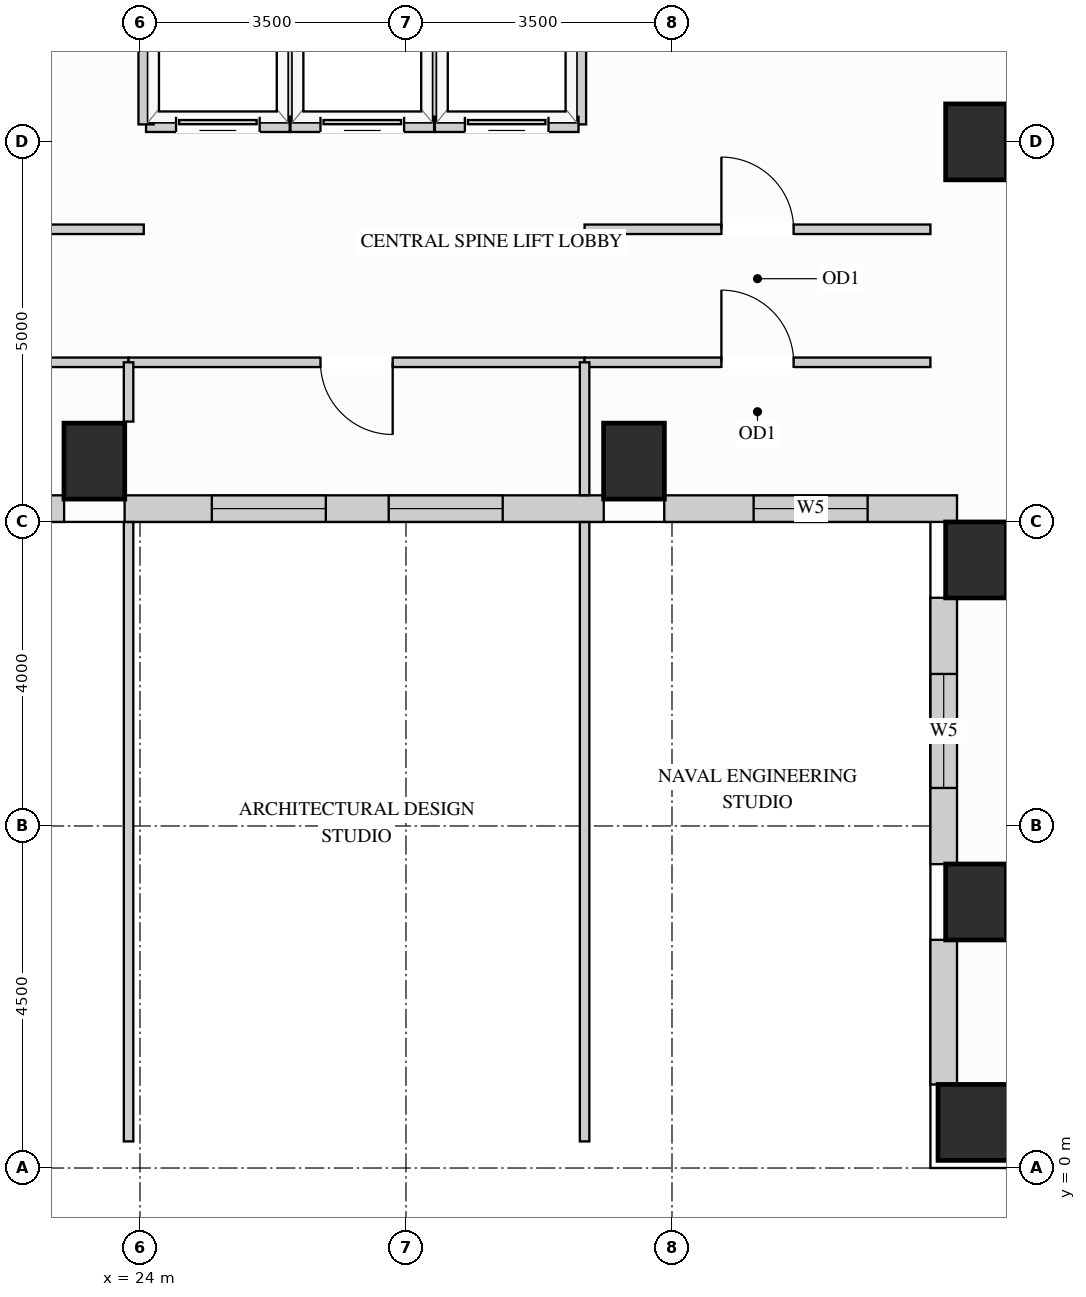
"""IFC4 building model, lengths in metres.
Left out: names, types, materials, properties, quantities, classifications, styles, units other than length and angle.
Written with IfcOpenShell. Run it as: python <this file> out.ifc"""

import sys

from ifc_helpers import new_model, si_unit, direction, frame, frame_2d, origin, origin_2d, place, context, subcontext, project, spatial, rectangle, extrude, source, transform, mapped, element, fill, save


model = new_model("IFC4")
c1 = context("Model", 3, precision=1e-05, world=origin(), true_north=direction((0.0, 1.0)))
c2 = subcontext(c1, "Body", "Model", "MODEL_VIEW")
j1 = project(units=[si_unit("LENGTHUNIT", "METRE"), si_unit("PLANEANGLEUNIT", "RADIAN")], contexts=[c1])
p1 = place(None, origin())
s1 = spatial("IfcSite", under=j1, at=p1, CompositionType="ELEMENT")
p2 = place(p1, origin())
s2 = spatial("IfcBuilding", under=s1, at=p2, CompositionType="ELEMENT")
p3 = place(p2, frame((0.0, 0.0, 200.7)))
s3 = spatial("IfcBuildingStorey", under=s2, at=p3, CompositionType="ELEMENT", Elevation=200.7)
m1 = source(origin(), c2, "Body", "SweptSolid", [
    extrude(rectangle(XDim=0.8, YDim=1.0, at=origin_2d()), origin(), (0.0, 0.0, 1.0), 3.4),
])
for number, where, z_axis, x_axis in (
    (1, (35.0, 13.5, 0.0), (0.0, 0.0, 1.0), (1.0, 0.0, 0.0)),
    (2, (35.0, 3.5, 0.0), (0.0, 0.0, 1.0), (1.0, 0.0, 0.0)),
    (3, (35.0, 8.0, 0.0), (0.0, 0.0, 1.0), (1.0, 0.0, 0.0)),
    (4, (23.4, 9.3, 0.0), (0.0, 0.0, 1.0), (1.0, 0.0, 0.0)),
    (5, (30.5, 9.3, 0.0), (0.0, 0.0, 1.0), (1.0, 0.0, 0.0)),
):
    element("IfcColumn", number, at=place(p3, frame(where, z_axis=z_axis, x_axis=x_axis)), inside=s3, PredefinedType="COLUMN", context=c2, shape_type="MappedRepresentation", body=[
        mapped(m1, transform((0.0, 0.0, 0.0), x_axis=(1.0, 0.0, 0.0), y_axis=(0.0, 1.0, 0.0), z_axis=(0.0, 0.0, 1.0))),
    ])
m2 = source(origin(), c2, "Body", "SweptSolid", [
    extrude(rectangle(XDim=1.0, YDim=1.0, at=origin_2d()), origin(), (0.0, 0.0, 1.0), 3.4),
])
p4 = place(p3, frame((35.0, 0.6, 0.0), z_axis=(0.0, 0.0, 1.0), x_axis=(1.0, 0.0, 0.0)))
e6 = element("IfcColumn", 6, at=p4, inside=s3, PredefinedType="COLUMN", context=c2, shape_type="MappedRepresentation", body=[
    mapped(m2, transform((0.0, 0.0, 0.0), x_axis=(1.0, 0.0, 0.0), y_axis=(0.0, 1.0, 0.0), z_axis=(0.0, 0.0, 1.0))),
])
p5 = place(p3, frame((19.398, 8.675, 0.0), z_axis=(0.0, 0.0, 1.0), x_axis=(1.0, 0.0, 0.0)))
e7 = element("IfcWall", 7, at=p5, inside=s3, PredefinedType="SOLIDWALL", context=c2, shape_type="SweptSolid", body=[
    extrude(rectangle(XDim=3.604, YDim=0.35, at=frame_2d((1.802, 0.0))), origin(), (0.0, 0.0, 1.0), 3.385),
])
p6 = place(p5, frame((1.067, 0.0, 0.78)))
e8 = element("IfcOpeningElement", 8, at=p6, cuts=e7, PredefinedType="OPENING", context=c2, shape_type="SweptSolid", body=[
    extrude(rectangle(XDim=1.5, YDim=2.0, at=frame_2d((0.75, 1.0))), frame((0.0, 0.185, 0.0), z_axis=(0.0, -1.0, 0.0), x_axis=(1.0, 0.0, 0.0)), (0.0, 0.0, 1.0), 0.37),
])
p7 = place(p3, frame((23.798, 8.675, 0.0), z_axis=(0.0, 0.0, 1.0), x_axis=(1.0, 0.0, 0.0)))
e9 = element("IfcWall", 9, at=p7, inside=s3, PredefinedType="SOLIDWALL", context=c2, shape_type="SweptSolid", body=[
    extrude(rectangle(XDim=6.304, YDim=0.35, at=frame_2d((3.152, 0.0))), origin(), (0.0, 0.0, 1.0), 3.385),
])
p8 = place(p7, frame((1.147, 0.0, 0.78)))
e10 = element("IfcOpeningElement", 10, at=p8, cuts=e9, PredefinedType="OPENING", context=c2, shape_type="SweptSolid", body=[
    extrude(rectangle(XDim=1.5, YDim=2.0, at=frame_2d((0.75, 1.0))), frame((0.0, 0.185, 0.0), z_axis=(0.0, -1.0, 0.0), x_axis=(1.0, 0.0, 0.0)), (0.0, 0.0, 1.0), 0.37),
])
p9 = place(p7, frame((3.475, 0.0, 0.78)))
e11 = element("IfcOpeningElement", 11, at=p9, cuts=e9, PredefinedType="OPENING", context=c2, shape_type="SweptSolid", body=[
    extrude(rectangle(XDim=1.5, YDim=2.0, at=frame_2d((0.75, 1.0))), frame((0.0, 0.185, 0.0), z_axis=(0.0, -1.0, 0.0), x_axis=(1.0, 0.0, 0.0)), (0.0, 0.0, 1.0), 0.37),
])
p10 = place(p3, frame((30.898, 8.675, 0.0), z_axis=(0.0, 0.0, 1.0), x_axis=(1.0, 0.0, 0.0)))
e12 = element("IfcWall", 12, at=p10, inside=s3, PredefinedType="SOLIDWALL", context=c2, shape_type="SweptSolid", body=[
    extrude(rectangle(XDim=3.852, YDim=0.35, at=frame_2d((1.926, 0.0))), origin(), (0.0, 0.0, 1.0), 3.385),
])
p11 = place(p10, frame((1.176, 0.0, 0.78)))
e13 = element("IfcOpeningElement", 13, at=p11, cuts=e12, PredefinedType="OPENING", context=c2, shape_type="SweptSolid", body=[
    extrude(rectangle(XDim=1.5, YDim=2.0, at=frame_2d((0.75, 1.0))), frame((0.0, 0.185, 0.0), z_axis=(0.0, -1.0, 0.0), x_axis=(1.0, 0.0, 0.0)), (0.0, 0.0, 1.0), 0.37),
])
p12 = place(p3, frame((34.575, 7.502, 0.0), z_axis=(0.0, 0.0, 1.0), x_axis=(0.0, -1.0, 0.0)))
e14 = element("IfcWall", 14, at=p12, inside=s3, PredefinedType="SOLIDWALL", context=c2, shape_type="SweptSolid", body=[
    extrude(rectangle(XDim=3.504, YDim=0.35, at=frame_2d((1.752, 0.0))), origin(), (0.0, 0.0, 1.0), 2.612),
])
p13 = place(p12, frame((1.002, 0.0, 0.78)))
e15 = element("IfcOpeningElement", 15, at=p13, cuts=e14, PredefinedType="OPENING", context=c2, shape_type="SweptSolid", body=[
    extrude(rectangle(XDim=1.5, YDim=1.652, at=frame_2d((0.75, 0.826))), frame((0.0, 0.185, 0.0), z_axis=(0.0, -1.0, 0.0), x_axis=(1.0, 0.0, 0.0)), (0.0, 0.0, 1.0), 0.37),
])
m3 = source(origin(), c2, "Body", "SweptSolid", [
    extrude(rectangle(XDim=1.904, YDim=0.35, at=frame_2d((0.952, 0.0))), origin(), (0.0, 0.0, 1.0), 2.612),
])
p14 = place(p3, frame((34.575, 3.002, 0.0), z_axis=(0.0, 0.0, 1.0), x_axis=(0.0, -1.0, 0.0)))
e16 = element("IfcWall", 16, at=p14, inside=s3, PredefinedType="SOLIDWALL", context=c2, shape_type="MappedRepresentation", body=[
    mapped(m3, transform((0.0, 0.0, 0.0), x_axis=(1.0, 0.0, 0.0), y_axis=(0.0, 1.0, 0.0), z_axis=(0.0, 0.0, 1.0))),
])
p15 = place(p3, frame((29.85, 12.35, 0.0), z_axis=(0.0, 0.0, 1.0), x_axis=(1.0, 0.0, 0.0)))
e17 = element("IfcWall", 17, at=p15, inside=s3, PredefinedType="PARTITIONING", context=c2, shape_type="SweptSolid", body=[
    extrude(rectangle(XDim=4.55, YDim=0.125, at=frame_2d((2.275, 0.0))), origin(), (0.0, 0.0, 1.0), 3.385),
])
p16 = place(p15, frame((1.8, 0.0, 0.0)))
e18 = element("IfcOpeningElement", 18, at=p16, cuts=e17, PredefinedType="OPENING", context=c2, shape_type="SweptSolid", body=[
    extrude(rectangle(XDim=0.95, YDim=2.15, at=frame_2d((0.475, 1.075))), frame((0.0, 0.073, 0.0), z_axis=(0.0, -1.0, 0.0), x_axis=(1.0, 0.0, 0.0)), (0.0, 0.0, 1.0), 0.145),
])
p17 = place(p3, frame((19.5, 12.35, 0.0), z_axis=(0.0, 0.0, 1.0), x_axis=(1.0, 0.0, 0.0)))
e19 = element("IfcWall", 19, at=p17, inside=s3, PredefinedType="PARTITIONING", context=c2, shape_type="SweptSolid", body=[
    extrude(rectangle(XDim=4.55, YDim=0.125, at=frame_2d((2.275, 0.0))), origin(), (0.0, 0.0, 1.0), 3.385),
])
p18 = place(p17, frame((1.8, 0.0, 0.0)))
e20 = element("IfcOpeningElement", 20, at=p18, cuts=e19, PredefinedType="OPENING", context=c2, shape_type="SweptSolid", body=[
    extrude(rectangle(XDim=0.95, YDim=2.15, at=frame_2d((0.475, 1.075))), frame((0.0, 0.073, 0.0), z_axis=(0.0, -1.0, 0.0), x_axis=(1.0, 0.0, 0.0)), (0.0, 0.0, 1.0), 0.145),
])
p19 = place(p3, frame((19.5, 10.6, 0.0), z_axis=(0.0, 0.0, 1.0), x_axis=(1.0, 0.0, 0.0)))
e21 = element("IfcWall", 21, at=p19, inside=s3, PredefinedType="PARTITIONING", context=c2, shape_type="SweptSolid", body=[
    extrude(rectangle(XDim=4.35, YDim=0.125, at=frame_2d((2.175, 0.0))), origin(), (0.0, 0.0, 1.0), 3.385),
])
p20 = place(p19, frame((1.7, 0.0, 0.0)))
e22 = element("IfcOpeningElement", 22, at=p20, cuts=e21, PredefinedType="OPENING", context=c2, shape_type="SweptSolid", body=[
    extrude(rectangle(XDim=0.95, YDim=2.15, at=frame_2d((0.475, 1.075))), frame((0.0, 0.073, 0.0), z_axis=(0.0, -1.0, 0.0), x_axis=(1.0, 0.0, 0.0)), (0.0, 0.0, 1.0), 0.145),
])
p21 = place(p3, frame((23.85, 10.6, 0.0), z_axis=(0.0, 0.0, 1.0), x_axis=(1.0, 0.0, 0.0)))
e23 = element("IfcWall", 23, at=p21, inside=s3, PredefinedType="PARTITIONING", context=c2, shape_type="SweptSolid", body=[
    extrude(rectangle(XDim=6.0, YDim=0.125, at=frame_2d((3.0, 0.0))), origin(), (0.0, 0.0, 1.0), 3.385),
])
p22 = place(p21, frame((2.525, 0.0, 0.0)))
e24 = element("IfcOpeningElement", 24, at=p22, cuts=e23, PredefinedType="OPENING", context=c2, shape_type="SweptSolid", body=[
    extrude(rectangle(XDim=0.95, YDim=2.15, at=frame_2d((0.475, 1.075))), frame((0.0, 0.073, 0.0), z_axis=(0.0, -1.0, 0.0), x_axis=(1.0, 0.0, 0.0)), (0.0, 0.0, 1.0), 0.145),
])
p23 = place(p3, frame((29.85, 10.6, 0.0), z_axis=(0.0, 0.0, 1.0), x_axis=(1.0, 0.0, 0.0)))
e25 = element("IfcWall", 25, at=p23, inside=s3, PredefinedType="PARTITIONING", context=c2, shape_type="SweptSolid", body=[
    extrude(rectangle(XDim=4.55, YDim=0.125, at=frame_2d((2.275, 0.0))), origin(), (0.0, 0.0, 1.0), 3.385),
])
p24 = place(p23, frame((1.8, 0.0, 0.0)))
e26 = element("IfcOpeningElement", 26, at=p24, cuts=e25, PredefinedType="OPENING", context=c2, shape_type="SweptSolid", body=[
    extrude(rectangle(XDim=0.95, YDim=2.15, at=frame_2d((0.475, 1.075))), frame((0.0, 0.073, 0.0), z_axis=(0.0, -1.0, 0.0), x_axis=(1.0, 0.0, 0.0)), (0.0, 0.0, 1.0), 0.145),
])
m4 = source(origin(), c2, "Body", "SweptSolid", [
    extrude(rectangle(XDim=8.148, YDim=0.125, at=frame_2d((4.074, 0.0))), origin(), (0.0, 0.0, 1.0), 3.385),
])
p25 = place(p3, frame((23.85, 0.35, 0.0), z_axis=(0.0, 0.0, 1.0), x_axis=(0.0, 1.0, 0.0)))
e27 = element("IfcWall", 27, at=p25, inside=s3, PredefinedType="PARTITIONING", context=c2, shape_type="MappedRepresentation", body=[
    mapped(m4, transform((0.0, 0.0, 0.0), x_axis=(1.0, 0.0, 0.0), y_axis=(0.0, 1.0, 0.0), z_axis=(0.0, 0.0, 1.0))),
])
m5 = source(origin(), c2, "Body", "SweptSolid", [
    extrude(rectangle(XDim=0.78, YDim=0.125, at=frame_2d((0.39, 0.0))), origin(), (0.0, 0.0, 1.0), 3.385),
])
p26 = place(p3, frame((23.85, 9.82, 0.0), z_axis=(0.0, 0.0, 1.0), x_axis=(0.0, 1.0, 0.0)))
e28 = element("IfcWall", 28, at=p26, inside=s3, PredefinedType="PARTITIONING", context=c2, shape_type="MappedRepresentation", body=[
    mapped(m5, transform((0.0, 0.0, 0.0), x_axis=(1.0, 0.0, 0.0), y_axis=(0.0, 1.0, 0.0), z_axis=(0.0, 0.0, 1.0))),
])
p27 = place(p3, frame((29.85, 0.35, 0.0), z_axis=(0.0, 0.0, 1.0), x_axis=(0.0, 1.0, 0.0)))
e29 = element("IfcWall", 29, at=p27, inside=s3, PredefinedType="PARTITIONING", context=c2, shape_type="MappedRepresentation", body=[
    mapped(m4, transform((0.0, 0.0, 0.0), x_axis=(1.0, 0.0, 0.0), y_axis=(0.0, 1.0, 0.0), z_axis=(0.0, 0.0, 1.0))),
])
m6 = source(origin(), c2, "Body", "SweptSolid", [
    extrude(rectangle(XDim=1.748, YDim=0.125, at=frame_2d((0.874, 0.0))), origin(), (0.0, 0.0, 1.0), 3.385),
])
p28 = place(p3, frame((29.85, 8.852, 0.0), z_axis=(0.0, 0.0, 1.0), x_axis=(0.0, 1.0, 0.0)))
e30 = element("IfcWall", 30, at=p28, inside=s3, PredefinedType="PARTITIONING", context=c2, shape_type="MappedRepresentation", body=[
    mapped(m6, transform((0.0, 0.0, 0.0), x_axis=(1.0, 0.0, 0.0), y_axis=(0.0, 1.0, 0.0), z_axis=(0.0, 0.0, 1.0))),
])
m7 = source(origin(), c2, "Body", "SweptSolid", [
    extrude(rectangle(XDim=2.29, YDim=0.2, at=frame_2d((1.145, 0.0))), origin(), (0.0, 0.0, 1.0), 3.385),
])
p29 = place(p3, frame((25.97, 13.73, 0.0), z_axis=(0.0, 0.0, 1.0), x_axis=(0.0, 1.0, 0.0)))
e31 = element("IfcWall", 31, at=p29, inside=s3, PredefinedType="PARTITIONING", context=c2, shape_type="MappedRepresentation", body=[
    mapped(m7, transform((0.0, 0.0, 0.0), x_axis=(1.0, 0.0, 0.0), y_axis=(0.0, 1.0, 0.0), z_axis=(0.0, 0.0, 1.0))),
])
p30 = place(p3, frame((24.08, 13.73, 0.0), z_axis=(0.0, 0.0, 1.0), x_axis=(1.0, 0.0, 0.0)))
e32 = element("IfcWall", 32, at=p30, inside=s3, PredefinedType="PARTITIONING", context=c2, shape_type="SweptSolid", body=[
    extrude(rectangle(XDim=1.89, YDim=0.2, at=frame_2d((0.945, 0.0))), origin(), (0.0, 0.0, 1.0), 2.466),
])
p31 = place(p30, frame((0.395, 0.0, 0.0)))
e33 = element("IfcOpeningElement", 33, at=p31, cuts=e32, PredefinedType="OPENING", context=c2, shape_type="SweptSolid", body=[
    extrude(rectangle(XDim=1.1, YDim=2.2, at=frame_2d((0.55, 1.1))), frame((0.0, 0.11, 0.0), z_axis=(0.0, -1.0, 0.0), x_axis=(1.0, 0.0, 0.0)), (0.0, 0.0, 1.0), 0.22),
])
for number, where, z_axis, x_axis in (
    (34, (24.08, 13.73, 0.0), (0.0, 0.0, 1.0), (0.0, 1.0, 0.0)),
    (35, (27.87, 13.73, 0.0), (0.0, 0.0, 1.0), (0.0, 1.0, 0.0)),
):
    element("IfcWall", number, at=place(p3, frame(where, z_axis=z_axis, x_axis=x_axis)), inside=s3, PredefinedType="PARTITIONING", context=c2, shape_type="MappedRepresentation", body=[
        mapped(m7, transform((0.0, 0.0, 0.0), x_axis=(1.0, 0.0, 0.0), y_axis=(0.0, 1.0, 0.0), z_axis=(0.0, 0.0, 1.0))),
    ])
p32 = place(p3, frame((25.98, 13.73, 0.0), z_axis=(0.0, 0.0, 1.0), x_axis=(1.0, 0.0, 0.0)))
e36 = element("IfcWall", 36, at=p32, inside=s3, PredefinedType="PARTITIONING", context=c2, shape_type="SweptSolid", body=[
    extrude(rectangle(XDim=1.89, YDim=0.2, at=frame_2d((0.945, 0.0))), origin(), (0.0, 0.0, 1.0), 2.466),
])
p33 = place(p32, frame((0.395, 0.0, 0.0)))
e37 = element("IfcOpeningElement", 37, at=p33, cuts=e36, PredefinedType="OPENING", context=c2, shape_type="SweptSolid", body=[
    extrude(rectangle(XDim=1.1, YDim=2.2, at=frame_2d((0.55, 1.1))), frame((0.0, 0.11, 0.0), z_axis=(0.0, -1.0, 0.0), x_axis=(1.0, 0.0, 0.0)), (0.0, 0.0, 1.0), 0.22),
])
p34 = place(p3, frame((29.77, 13.73, 0.0), z_axis=(0.0, 0.0, 1.0), x_axis=(0.0, 1.0, 0.0)))
e38 = element("IfcWall", 38, at=p34, inside=s3, PredefinedType="PARTITIONING", context=c2, shape_type="MappedRepresentation", body=[
    mapped(m7, transform((0.0, 0.0, 0.0), x_axis=(1.0, 0.0, 0.0), y_axis=(0.0, 1.0, 0.0), z_axis=(0.0, 0.0, 1.0))),
])
p35 = place(p3, frame((27.88, 13.73, 0.0), z_axis=(0.0, 0.0, 1.0), x_axis=(1.0, 0.0, 0.0)))
e39 = element("IfcWall", 39, at=p35, inside=s3, PredefinedType="PARTITIONING", context=c2, shape_type="SweptSolid", body=[
    extrude(rectangle(XDim=1.89, YDim=0.2, at=frame_2d((0.945, 0.0))), origin(), (0.0, 0.0, 1.0), 2.466),
])
p36 = place(p35, frame((0.395, 0.0, 0.0)))
e40 = element("IfcOpeningElement", 40, at=p36, cuts=e39, PredefinedType="OPENING", context=c2, shape_type="SweptSolid", body=[
    extrude(rectangle(XDim=1.1, YDim=2.2, at=frame_2d((0.55, 1.1))), frame((0.0, 0.11, 0.0), z_axis=(0.0, -1.0, 0.0), x_axis=(1.0, 0.0, 0.0)), (0.0, 0.0, 1.0), 0.22),
])
m8 = source(origin(), c2, "Body", "SweptSolid", [
    extrude(rectangle(XDim=1.1, YDim=2.2, at=frame_2d((0.55, 1.1))), frame((0.0, 0.025, 0.0), z_axis=(0.0, -1.0, 0.0), x_axis=(1.0, 0.0, 0.0)), (0.0, 0.0, 1.0), 0.05),
])
p37 = place(p31, origin())
e41 = element("IfcDoor", 41, at=p37, inside=s3, OperationType="SLIDING_TO_LEFT", PredefinedType="DOOR", context=c2, shape_type="MappedRepresentation", body=[
    mapped(m8, transform((0.0, 0.0, 0.0), x_axis=(1.0, 0.0, 0.0), y_axis=(0.0, 1.0, 0.0), z_axis=(0.0, 0.0, 1.0))),
])
fill(e33, e41)
p38 = place(p33, origin())
e42 = element("IfcDoor", 42, at=p38, inside=s3, OperationType="SLIDING_TO_LEFT", PredefinedType="DOOR", context=c2, shape_type="MappedRepresentation", body=[
    mapped(m8, transform((0.0, 0.0, 0.0), x_axis=(1.0, 0.0, 0.0), y_axis=(0.0, 1.0, 0.0), z_axis=(0.0, 0.0, 1.0))),
])
fill(e37, e42)
p39 = place(p36, origin())
e43 = element("IfcDoor", 43, at=p39, inside=s3, OperationType="SLIDING_TO_LEFT", PredefinedType="DOOR", context=c2, shape_type="MappedRepresentation", body=[
    mapped(m8, transform((0.0, 0.0, 0.0), x_axis=(1.0, 0.0, 0.0), y_axis=(0.0, 1.0, 0.0), z_axis=(0.0, 0.0, 1.0))),
])
fill(e40, e43)
m9 = source(origin(), c2, "Body", "SweptSolid", [
    extrude(rectangle(XDim=0.95, YDim=2.15, at=frame_2d((0.475, 1.075))), frame((0.0, 0.025, 0.0), z_axis=(0.0, -1.0, 0.0), x_axis=(1.0, 0.0, 0.0)), (0.0, 0.0, 1.0), 0.05),
])
p40 = place(p16, origin())
e44 = element("IfcDoor", 44, at=p40, inside=s3, OperationType="SINGLE_SWING_LEFT", PredefinedType="DOOR", context=c2, shape_type="MappedRepresentation", body=[
    mapped(m9, transform((0.0, 0.0, 0.0), x_axis=(1.0, 0.0, 0.0), y_axis=(0.0, 1.0, 0.0), z_axis=(0.0, 0.0, 1.0))),
])
fill(e18, e44)
p41 = place(p22, origin())
e45 = element("IfcDoor", 45, at=p41, inside=s3, OperationType="SINGLE_SWING_RIGHT", PredefinedType="DOOR", context=c2, shape_type="MappedRepresentation", body=[
    mapped(m9, transform((0.0, 0.0, 0.0), x_axis=(1.0, 0.0, 0.0), y_axis=(0.0, 1.0, 0.0), z_axis=(0.0, 0.0, 1.0))),
])
fill(e24, e45)
p42 = place(p24, origin())
e46 = element("IfcDoor", 46, at=p42, inside=s3, OperationType="SINGLE_SWING_LEFT", PredefinedType="DOOR", context=c2, shape_type="MappedRepresentation", body=[
    mapped(m9, transform((0.0, 0.0, 0.0), x_axis=(1.0, 0.0, 0.0), y_axis=(0.0, 1.0, 0.0), z_axis=(0.0, 0.0, 1.0))),
])
fill(e26, e46)
m10 = source(origin(), c2, "Body", "SweptSolid", [
    extrude(rectangle(XDim=1.5, YDim=2.0, at=frame_2d((0.75, 1.0))), frame((0.0, 0.03, 0.0), z_axis=(0.0, -1.0, 0.0), x_axis=(1.0, 0.0, 0.0)), (0.0, 0.0, 1.0), 0.06),
])
p43 = place(p8, origin())
e47 = element("IfcWindow", 47, at=p43, inside=s3, PartitioningType="SINGLE_PANEL", PredefinedType="WINDOW", context=c2, shape_type="MappedRepresentation", body=[
    mapped(m10, transform((0.0, 0.0, 0.0), x_axis=(1.0, 0.0, 0.0), y_axis=(0.0, 1.0, 0.0), z_axis=(0.0, 0.0, 1.0))),
])
fill(e10, e47)
p44 = place(p9, origin())
e48 = element("IfcWindow", 48, at=p44, inside=s3, PartitioningType="SINGLE_PANEL", PredefinedType="WINDOW", context=c2, shape_type="MappedRepresentation", body=[
    mapped(m10, transform((0.0, 0.0, 0.0), x_axis=(1.0, 0.0, 0.0), y_axis=(0.0, 1.0, 0.0), z_axis=(0.0, 0.0, 1.0))),
])
fill(e11, e48)
p45 = place(p11, origin())
e49 = element("IfcWindow", 49, at=p45, inside=s3, PartitioningType="SINGLE_PANEL", PredefinedType="WINDOW", context=c2, shape_type="MappedRepresentation", body=[
    mapped(m10, transform((0.0, 0.0, 0.0), x_axis=(1.0, 0.0, 0.0), y_axis=(0.0, 1.0, 0.0), z_axis=(0.0, 0.0, 1.0))),
])
fill(e13, e49)
m11 = source(origin(), c2, "Body", "SweptSolid", [
    extrude(rectangle(XDim=1.5, YDim=1.652, at=frame_2d((0.75, 0.826))), frame((0.0, 0.03, 0.0), z_axis=(0.0, -1.0, 0.0), x_axis=(1.0, 0.0, 0.0)), (0.0, 0.0, 1.0), 0.06),
])
p46 = place(p13, origin())
e50 = element("IfcWindow", 50, at=p46, inside=s3, PartitioningType="SINGLE_PANEL", PredefinedType="WINDOW", context=c2, shape_type="MappedRepresentation", body=[
    mapped(m11, transform((0.0, 0.0, 0.0), x_axis=(1.0, 0.0, 0.0), y_axis=(0.0, 1.0, 0.0), z_axis=(0.0, 0.0, 1.0))),
])
fill(e15, e50)
save(model, sys.argv[1])
